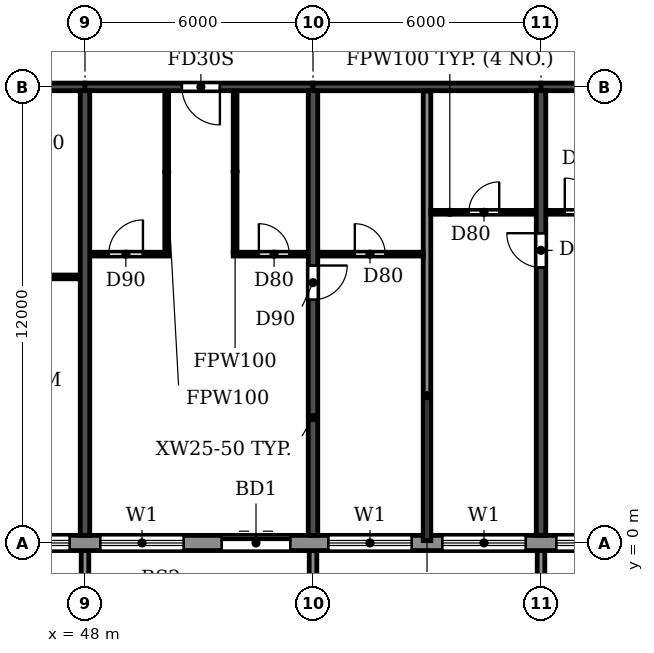
"""IFC4 building model, lengths in metres.
Left out: names, types, materials, properties, quantities, classifications, styles, units other than length and angle.
Written with IfcOpenShell. Run it as: python <this file> out.ifc"""

import sys

from ifc_helpers import new_model, si_unit, direction, frame, frame_2d, origin, place, context, subcontext, project, spatial, polyline, rectangle, outline, extrude, source, transform, mapped, element, fill, save


model = new_model("IFC4")
c1 = context("Model", 3, precision=1e-05, world=origin(), true_north=direction((0.0, 1.0)))
c2 = subcontext(c1, "Body", "Model", "MODEL_VIEW")
j1 = project(units=[si_unit("LENGTHUNIT", "METRE"), si_unit("PLANEANGLEUNIT", "RADIAN")], contexts=[c1])
p1 = place(None, origin())
s1 = spatial("IfcSite", under=j1, at=p1, CompositionType="ELEMENT")
p2 = place(p1, origin())
s2 = spatial("IfcBuilding", under=s1, at=p2, CompositionType="ELEMENT")
p3 = place(p2, frame((0.0, 0.0, 251.1)))
s3 = spatial("IfcBuildingStorey", under=s2, at=p3, CompositionType="ELEMENT", Elevation=251.1)
p4 = place(p3, frame((48.0, 0.2, 0.0), z_axis=(0.0, 0.0, 1.0), x_axis=(0.0, 1.0, 0.0)))
e1 = element("IfcWall", 1, at=p4, inside=s3, PredefinedType="SHEAR", context=c2, shape_type="SweptSolid", body=[
    extrude(rectangle(XDim=11.7, YDim=0.25, at=frame_2d((5.85, 0.0))), origin(), (0.0, 0.0, 1.0), 3.08),
])
p5 = place(p3, frame((54.0, 0.2, 0.0), z_axis=(0.0, 0.0, 1.0), x_axis=(0.0, 1.0, 0.0)))
e2 = element("IfcWall", 2, at=p5, inside=s3, PredefinedType="SHEAR", context=c2, shape_type="SweptSolid", body=[
    extrude(rectangle(XDim=11.7, YDim=0.25, at=frame_2d((5.85, 0.0))), origin(), (0.0, 0.0, 1.0), 3.08),
])
p6 = place(p5, frame((6.2, 0.0, 0.0)))
e3 = element("IfcOpeningElement", 3, at=p6, cuts=e2, PredefinedType="OPENING", context=c2, shape_type="SweptSolid", body=[
    extrude(rectangle(XDim=0.9, YDim=2.1, at=frame_2d((0.45, 1.05))), frame((0.0, 0.135, 0.0), z_axis=(0.0, -1.0, 0.0), x_axis=(1.0, 0.0, 0.0)), (0.0, 0.0, 1.0), 0.27),
])
p7 = place(p3, frame((60.0, 0.2, 0.0), z_axis=(0.0, 0.0, 1.0), x_axis=(0.0, 1.0, 0.0)))
e4 = element("IfcWall", 4, at=p7, inside=s3, PredefinedType="SHEAR", context=c2, shape_type="SweptSolid", body=[
    extrude(rectangle(XDim=11.7, YDim=0.25, at=frame_2d((5.85, 0.0))), origin(), (0.0, 0.0, 1.0), 3.08),
])
p8 = place(p7, frame((7.05, 0.0, 0.0)))
e5 = element("IfcOpeningElement", 5, at=p8, cuts=e4, PredefinedType="OPENING", context=c2, shape_type="SweptSolid", body=[
    extrude(rectangle(XDim=0.9, YDim=2.1, at=frame_2d((0.45, 1.05))), frame((0.0, 0.135, 0.0), z_axis=(0.0, -1.0, 0.0), x_axis=(1.0, 0.0, 0.0)), (0.0, 0.0, 1.0), 0.27),
])
p9 = place(p3, frame((42.0, 12.0, 0.0), z_axis=(0.0, 0.0, 1.0), x_axis=(1.0, 0.0, 0.0)))
e6 = element("IfcWall", 6, at=p9, inside=s3, PredefinedType="SHEAR", context=c2, shape_type="SweptSolid", body=[
    extrude(rectangle(XDim=6.0, YDim=0.2, at=frame_2d((3.0, 0.0))), origin(), (0.0, 0.0, 1.0), 2.48),
])
p10 = place(p9, frame((2.55, 0.0, 0.0)))
e7 = element("IfcOpeningElement", 7, at=p10, cuts=e6, PredefinedType="OPENING", context=c2, shape_type="SweptSolid", body=[
    extrude(rectangle(XDim=1.0, YDim=2.1, at=frame_2d((0.5, 1.05))), frame((0.0, 0.11, 0.0), z_axis=(0.0, -1.0, 0.0), x_axis=(1.0, 0.0, 0.0)), (0.0, 0.0, 1.0), 0.22),
])
p11 = place(p3, frame((48.0, 12.0, 0.0), z_axis=(0.0, 0.0, 1.0), x_axis=(1.0, 0.0, 0.0)))
e8 = element("IfcWall", 8, at=p11, inside=s3, PredefinedType="SHEAR", context=c2, shape_type="SweptSolid", body=[
    extrude(rectangle(XDim=6.0, YDim=0.2, at=frame_2d((3.0, 0.0))), origin(), (0.0, 0.0, 1.0), 2.48),
])
p12 = place(p11, frame((2.55, 0.0, 0.0)))
e9 = element("IfcOpeningElement", 9, at=p12, cuts=e8, PredefinedType="OPENING", context=c2, shape_type="SweptSolid", body=[
    extrude(rectangle(XDim=1.0, YDim=2.1, at=frame_2d((0.5, 1.05))), frame((0.0, 0.11, 0.0), z_axis=(0.0, -1.0, 0.0), x_axis=(1.0, 0.0, 0.0)), (0.0, 0.0, 1.0), 0.22),
])
p13 = place(p3, frame((54.0, 12.0, 0.0), z_axis=(0.0, 0.0, 1.0), x_axis=(1.0, 0.0, 0.0)))
e10 = element("IfcWall", 10, at=p13, inside=s3, PredefinedType="SHEAR", context=c2, shape_type="SweptSolid", body=[
    extrude(rectangle(XDim=6.0, YDim=0.2, at=frame_2d((3.0, 0.0))), origin(), (0.0, 0.0, 1.0), 2.48),
])
p14 = place(p3, frame((60.0, 12.0, 0.0), z_axis=(0.0, 0.0, 1.0), x_axis=(1.0, 0.0, 0.0)))
e11 = element("IfcWall", 11, at=p14, inside=s3, PredefinedType="SHEAR", context=c2, shape_type="SweptSolid", body=[
    extrude(rectangle(XDim=6.0, YDim=0.2, at=frame_2d((3.0, 0.0))), origin(), (0.0, 0.0, 1.0), 2.48),
])
p15 = place(p14, frame((2.55, 0.0, 0.0)))
e12 = element("IfcOpeningElement", 12, at=p15, cuts=e11, PredefinedType="OPENING", context=c2, shape_type="SweptSolid", body=[
    extrude(rectangle(XDim=1.0, YDim=2.1, at=frame_2d((0.5, 1.05))), frame((0.0, 0.11, 0.0), z_axis=(0.0, -1.0, 0.0), x_axis=(1.0, 0.0, 0.0)), (0.0, 0.0, 1.0), 0.22),
])
p16 = place(p3, frame((22.683, 0.0, 0.0), z_axis=(0.0, 0.0, 1.0), x_axis=(1.0, 0.0, 0.0)))
e13 = element("IfcWall", 13, at=p16, inside=s3, PredefinedType="STANDARD", context=c2, shape_type="SweptSolid", body=[
    extrude(rectangle(XDim=56.634, YDim=0.4, at=frame_2d((28.317, 0.0))), origin(), (0.0, 0.0, 1.0), 3.08),
])
p17 = place(p16, frame((1.717, 0.0, 0.9)))
e14 = element("IfcOpeningElement", 14, at=p17, cuts=e13, PredefinedType="OPENING", context=c2, shape_type="SweptSolid", body=[
    extrude(rectangle(XDim=2.2, YDim=1.5, at=frame_2d((1.1, 0.75))), frame((0.0, 0.21, 0.0), z_axis=(0.0, -1.0, 0.0), x_axis=(1.0, 0.0, 0.0)), (0.0, 0.0, 1.0), 0.42),
])
p18 = place(p16, frame((4.917, 0.0, 0.0)))
e15 = element("IfcOpeningElement", 15, at=p18, cuts=e13, PredefinedType="OPENING", context=c2, shape_type="SweptSolid", body=[
    extrude(rectangle(XDim=1.8, YDim=2.4, at=frame_2d((0.9, 1.2))), frame((0.0, 0.21, 0.0), z_axis=(0.0, -1.0, 0.0), x_axis=(1.0, 0.0, 0.0)), (0.0, 0.0, 1.0), 0.42),
])
p19 = place(p16, frame((7.717, 0.0, 0.9)))
e16 = element("IfcOpeningElement", 16, at=p19, cuts=e13, PredefinedType="OPENING", context=c2, shape_type="SweptSolid", body=[
    extrude(rectangle(XDim=2.2, YDim=1.5, at=frame_2d((1.1, 0.75))), frame((0.0, 0.21, 0.0), z_axis=(0.0, -1.0, 0.0), x_axis=(1.0, 0.0, 0.0)), (0.0, 0.0, 1.0), 0.42),
])
p20 = place(p16, frame((10.717, 0.0, 0.9)))
e17 = element("IfcOpeningElement", 17, at=p20, cuts=e13, PredefinedType="OPENING", context=c2, shape_type="SweptSolid", body=[
    extrude(rectangle(XDim=2.2, YDim=1.5, at=frame_2d((1.1, 0.75))), frame((0.0, 0.21, 0.0), z_axis=(0.0, -1.0, 0.0), x_axis=(1.0, 0.0, 0.0)), (0.0, 0.0, 1.0), 0.42),
])
p21 = place(p16, frame((13.717, 0.0, 0.9)))
e18 = element("IfcOpeningElement", 18, at=p21, cuts=e13, PredefinedType="OPENING", context=c2, shape_type="SweptSolid", body=[
    extrude(rectangle(XDim=2.2, YDim=1.5, at=frame_2d((1.1, 0.75))), frame((0.0, 0.21, 0.0), z_axis=(0.0, -1.0, 0.0), x_axis=(1.0, 0.0, 0.0)), (0.0, 0.0, 1.0), 0.42),
])
p22 = place(p16, frame((16.917, 0.0, 0.0)))
e19 = element("IfcOpeningElement", 19, at=p22, cuts=e13, PredefinedType="OPENING", context=c2, shape_type="SweptSolid", body=[
    extrude(rectangle(XDim=1.8, YDim=2.4, at=frame_2d((0.9, 1.2))), frame((0.0, 0.21, 0.0), z_axis=(0.0, -1.0, 0.0), x_axis=(1.0, 0.0, 0.0)), (0.0, 0.0, 1.0), 0.42),
])
p23 = place(p16, frame((19.717, 0.0, 0.9)))
e20 = element("IfcOpeningElement", 20, at=p23, cuts=e13, PredefinedType="OPENING", context=c2, shape_type="SweptSolid", body=[
    extrude(rectangle(XDim=2.2, YDim=1.5, at=frame_2d((1.1, 0.75))), frame((0.0, 0.21, 0.0), z_axis=(0.0, -1.0, 0.0), x_axis=(1.0, 0.0, 0.0)), (0.0, 0.0, 1.0), 0.42),
])
p24 = place(p16, frame((22.717, 0.0, 0.9)))
e21 = element("IfcOpeningElement", 21, at=p24, cuts=e13, PredefinedType="OPENING", context=c2, shape_type="SweptSolid", body=[
    extrude(rectangle(XDim=2.2, YDim=1.5, at=frame_2d((1.1, 0.75))), frame((0.0, 0.21, 0.0), z_axis=(0.0, -1.0, 0.0), x_axis=(1.0, 0.0, 0.0)), (0.0, 0.0, 1.0), 0.42),
])
p25 = place(p16, frame((25.717, 0.0, 0.9)))
e22 = element("IfcOpeningElement", 22, at=p25, cuts=e13, PredefinedType="OPENING", context=c2, shape_type="SweptSolid", body=[
    extrude(rectangle(XDim=2.2, YDim=1.5, at=frame_2d((1.1, 0.75))), frame((0.0, 0.21, 0.0), z_axis=(0.0, -1.0, 0.0), x_axis=(1.0, 0.0, 0.0)), (0.0, 0.0, 1.0), 0.42),
])
p26 = place(p16, frame((28.917, 0.0, 0.0)))
e23 = element("IfcOpeningElement", 23, at=p26, cuts=e13, PredefinedType="OPENING", context=c2, shape_type="SweptSolid", body=[
    extrude(rectangle(XDim=1.8, YDim=2.4, at=frame_2d((0.9, 1.2))), frame((0.0, 0.21, 0.0), z_axis=(0.0, -1.0, 0.0), x_axis=(1.0, 0.0, 0.0)), (0.0, 0.0, 1.0), 0.42),
])
p27 = place(p16, frame((31.717, 0.0, 0.9)))
e24 = element("IfcOpeningElement", 24, at=p27, cuts=e13, PredefinedType="OPENING", context=c2, shape_type="SweptSolid", body=[
    extrude(rectangle(XDim=2.2, YDim=1.5, at=frame_2d((1.1, 0.75))), frame((0.0, 0.21, 0.0), z_axis=(0.0, -1.0, 0.0), x_axis=(1.0, 0.0, 0.0)), (0.0, 0.0, 1.0), 0.42),
])
p28 = place(p16, frame((34.717, 0.0, 0.9)))
e25 = element("IfcOpeningElement", 25, at=p28, cuts=e13, PredefinedType="OPENING", context=c2, shape_type="SweptSolid", body=[
    extrude(rectangle(XDim=2.2, YDim=1.5, at=frame_2d((1.1, 0.75))), frame((0.0, 0.21, 0.0), z_axis=(0.0, -1.0, 0.0), x_axis=(1.0, 0.0, 0.0)), (0.0, 0.0, 1.0), 0.42),
])
p29 = place(p16, frame((37.717, 0.0, 0.9)))
e26 = element("IfcOpeningElement", 26, at=p29, cuts=e13, PredefinedType="OPENING", context=c2, shape_type="SweptSolid", body=[
    extrude(rectangle(XDim=2.2, YDim=1.5, at=frame_2d((1.1, 0.75))), frame((0.0, 0.21, 0.0), z_axis=(0.0, -1.0, 0.0), x_axis=(1.0, 0.0, 0.0)), (0.0, 0.0, 1.0), 0.42),
])
p30 = place(p16, frame((40.917, 0.0, 0.0)))
e27 = element("IfcOpeningElement", 27, at=p30, cuts=e13, PredefinedType="OPENING", context=c2, shape_type="SweptSolid", body=[
    extrude(rectangle(XDim=1.8, YDim=2.4, at=frame_2d((0.9, 1.2))), frame((0.0, 0.21, 0.0), z_axis=(0.0, -1.0, 0.0), x_axis=(1.0, 0.0, 0.0)), (0.0, 0.0, 1.0), 0.42),
])
p31 = place(p16, frame((43.717, 0.0, 0.9)))
e28 = element("IfcOpeningElement", 28, at=p31, cuts=e13, PredefinedType="OPENING", context=c2, shape_type="SweptSolid", body=[
    extrude(rectangle(XDim=2.2, YDim=1.5, at=frame_2d((1.1, 0.75))), frame((0.0, 0.21, 0.0), z_axis=(0.0, -1.0, 0.0), x_axis=(1.0, 0.0, 0.0)), (0.0, 0.0, 1.0), 0.42),
])
p32 = place(p16, frame((46.717, 0.0, 0.9)))
e29 = element("IfcOpeningElement", 29, at=p32, cuts=e13, PredefinedType="OPENING", context=c2, shape_type="SweptSolid", body=[
    extrude(rectangle(XDim=2.2, YDim=1.5, at=frame_2d((1.1, 0.75))), frame((0.0, 0.21, 0.0), z_axis=(0.0, -1.0, 0.0), x_axis=(1.0, 0.0, 0.0)), (0.0, 0.0, 1.0), 0.42),
])
p33 = place(p16, frame((49.717, 0.0, 0.9)))
e30 = element("IfcOpeningElement", 30, at=p33, cuts=e13, PredefinedType="OPENING", context=c2, shape_type="SweptSolid", body=[
    extrude(rectangle(XDim=2.2, YDim=1.5, at=frame_2d((1.1, 0.75))), frame((0.0, 0.21, 0.0), z_axis=(0.0, -1.0, 0.0), x_axis=(1.0, 0.0, 0.0)), (0.0, 0.0, 1.0), 0.42),
])
p34 = place(p16, frame((52.917, 0.0, 0.0)))
e31 = element("IfcOpeningElement", 31, at=p34, cuts=e13, PredefinedType="OPENING", context=c2, shape_type="SweptSolid", body=[
    extrude(rectangle(XDim=1.8, YDim=2.4, at=frame_2d((0.9, 1.2))), frame((0.0, 0.21, 0.0), z_axis=(0.0, -1.0, 0.0), x_axis=(1.0, 0.0, 0.0)), (0.0, 0.0, 1.0), 0.42),
])
m1 = source(origin(), c2, "Body", "SweptSolid", [
    extrude(outline(polyline([(0.0, 0.0), (0.2, 0.0), (0.2, 1.65), (0.0, 1.65), (0.0, 0.0)])), origin(), (0.0, 0.0, 1.0), 3.1),
])
for number, where in (
    (32, (47.9, -1.85, 0.0)),
    (33, (53.9, -1.85, 0.0)),
    (34, (59.9, -1.85, 0.0)),
):
    element("IfcWall", number, at=place(p3, frame(where)), inside=s3, PredefinedType="STANDARD", context=c2, shape_type="MappedRepresentation", body=[
        mapped(m1, transform((0.0, 0.0, 0.0))),
    ])
p35 = place(p3, frame((57.0, 0.06, 0.0), z_axis=(0.0, 0.0, 1.0), x_axis=(0.0, 1.0, 0.0)))
e35 = element("IfcWall", 35, at=p35, inside=s3, PredefinedType="PARTITIONING", context=c2, shape_type="SweptSolid", body=[
    extrude(rectangle(XDim=11.83, YDim=0.2, at=frame_2d((5.915, 0.0))), origin(), (0.0, 0.0, 1.0), 3.08),
])
p36 = place(p3, frame((45.9, 7.0, 0.0), z_axis=(0.0, 0.0, 1.0), x_axis=(1.0, 0.0, 0.0)))
e36 = element("IfcWall", 36, at=p36, inside=s3, PredefinedType="PARTITIONING", context=c2, shape_type="SweptSolid", body=[
    extrude(rectangle(XDim=1.965, YDim=0.1, at=frame_2d((0.982, 0.0))), origin(), (0.0, 0.0, 1.0), 3.08),
])
p37 = place(p3, frame((48.135, 7.6, 0.0), z_axis=(0.0, 0.0, 1.0), x_axis=(1.0, 0.0, 0.0)))
e37 = element("IfcWall", 37, at=p37, inside=s3, PredefinedType="PARTITIONING", context=c2, shape_type="SweptSolid", body=[
    extrude(rectangle(XDim=2.065, YDim=0.1, at=frame_2d((1.032, 0.0))), origin(), (0.0, 0.0, 1.0), 3.08),
])
p38 = place(p37, frame((0.49, 0.0, 0.0)))
e38 = element("IfcOpeningElement", 38, at=p38, cuts=e37, PredefinedType="OPENING", context=c2, shape_type="SweptSolid", body=[
    extrude(rectangle(XDim=0.9, YDim=2.1, at=frame_2d((0.45, 1.05))), frame((0.0, 0.06, 0.0), z_axis=(0.0, -1.0, 0.0), x_axis=(1.0, 0.0, 0.0)), (0.0, 0.0, 1.0), 0.12),
])
p39 = place(p3, frame((51.9, 7.6, 0.0), z_axis=(0.0, 0.0, 1.0), x_axis=(1.0, 0.0, 0.0)))
e39 = element("IfcWall", 39, at=p39, inside=s3, PredefinedType="PARTITIONING", context=c2, shape_type="SweptSolid", body=[
    extrude(rectangle(XDim=1.965, YDim=0.1, at=frame_2d((0.982, 0.0))), origin(), (0.0, 0.0, 1.0), 3.08),
])
p40 = place(p39, frame((0.675, 0.0, 0.0)))
e40 = element("IfcOpeningElement", 40, at=p40, cuts=e39, PredefinedType="OPENING", context=c2, shape_type="SweptSolid", body=[
    extrude(rectangle(XDim=0.8, YDim=2.1, at=frame_2d((0.4, 1.05))), frame((0.0, 0.06, 0.0), z_axis=(0.0, -1.0, 0.0), x_axis=(1.0, 0.0, 0.0)), (0.0, 0.0, 1.0), 0.12),
])
p41 = place(p3, frame((54.135, 7.6, 0.0), z_axis=(0.0, 0.0, 1.0), x_axis=(1.0, 0.0, 0.0)))
e41 = element("IfcWall", 41, at=p41, inside=s3, PredefinedType="PARTITIONING", context=c2, shape_type="SweptSolid", body=[
    extrude(rectangle(XDim=2.765, YDim=0.1, at=frame_2d((1.382, 0.0))), origin(), (0.0, 0.0, 1.0), 3.08),
])
p42 = place(p41, frame((0.965, 0.0, 0.0)))
e42 = element("IfcOpeningElement", 42, at=p42, cuts=e41, PredefinedType="OPENING", context=c2, shape_type="SweptSolid", body=[
    extrude(rectangle(XDim=0.8, YDim=2.1, at=frame_2d((0.4, 1.05))), frame((0.0, 0.06, 0.0), z_axis=(0.0, -1.0, 0.0), x_axis=(1.0, 0.0, 0.0)), (0.0, 0.0, 1.0), 0.12),
])
p43 = place(p3, frame((57.1, 8.7, 0.0), z_axis=(0.0, 0.0, 1.0), x_axis=(1.0, 0.0, 0.0)))
e43 = element("IfcWall", 43, at=p43, inside=s3, PredefinedType="PARTITIONING", context=c2, shape_type="SweptSolid", body=[
    extrude(rectangle(XDim=2.765, YDim=0.1, at=frame_2d((1.382, 0.0))), origin(), (0.0, 0.0, 1.0), 3.08),
])
p44 = place(p43, frame((1.0, 0.0, 0.0)))
e44 = element("IfcOpeningElement", 44, at=p44, cuts=e43, PredefinedType="OPENING", context=c2, shape_type="SweptSolid", body=[
    extrude(rectangle(XDim=0.8, YDim=2.1, at=frame_2d((0.4, 1.05))), frame((0.0, 0.06, 0.0), z_axis=(0.0, -1.0, 0.0), x_axis=(1.0, 0.0, 0.0)), (0.0, 0.0, 1.0), 0.12),
])
p45 = place(p3, frame((60.135, 8.7, 0.0), z_axis=(0.0, 0.0, 1.0), x_axis=(1.0, 0.0, 0.0)))
e45 = element("IfcWall", 45, at=p45, inside=s3, PredefinedType="PARTITIONING", context=c2, shape_type="SweptSolid", body=[
    extrude(rectangle(XDim=2.065, YDim=0.1, at=frame_2d((1.032, 0.0))), origin(), (0.0, 0.0, 1.0), 3.08),
])
p46 = place(p45, frame((0.49, 0.0, 0.0)))
e46 = element("IfcOpeningElement", 46, at=p46, cuts=e45, PredefinedType="OPENING", context=c2, shape_type="SweptSolid", body=[
    extrude(rectangle(XDim=0.9, YDim=2.1, at=frame_2d((0.45, 1.05))), frame((0.0, 0.06, 0.0), z_axis=(0.0, -1.0, 0.0), x_axis=(1.0, 0.0, 0.0)), (0.0, 0.0, 1.0), 0.12),
])
for number, where, z_axis, x_axis in (
    (47, (50.15, 7.65, 0.0), (0.0, 0.0, 1.0), (0.0, 1.0, 0.0)),
    (48, (51.95, 7.65, 0.0), (0.0, 0.0, 1.0), (0.0, 1.0, 0.0)),
):
    element("IfcWall", number, at=place(p3, frame(where, z_axis=z_axis, x_axis=x_axis)), inside=s3, PredefinedType="PARTITIONING", context=c2, shape_type="SweptSolid", body=[
        extrude(rectangle(XDim=4.24, YDim=0.1, at=frame_2d((2.12, 0.0))), origin(), (0.0, 0.0, 1.0), 3.08),
    ])
p47 = place(p24, origin())
e49 = element("IfcWindow", 49, at=p47, inside=s3, PartitioningType="DOUBLE_PANEL_HORIZONTAL", PredefinedType="WINDOW", context=c2, shape_type="SweptSolid", body=[
    extrude(rectangle(XDim=2.2, YDim=1.5, at=frame_2d((1.1, 0.75))), frame((0.0, 0.03, 0.0), z_axis=(0.0, -1.0, 0.0), x_axis=(1.0, 0.0, 0.0)), (0.0, 0.0, 1.0), 0.06),
])
fill(e21, e49)
p48 = place(p25, origin())
e50 = element("IfcWindow", 50, at=p48, inside=s3, PartitioningType="DOUBLE_PANEL_HORIZONTAL", PredefinedType="WINDOW", context=c2, shape_type="SweptSolid", body=[
    extrude(rectangle(XDim=2.2, YDim=1.5, at=frame_2d((1.1, 0.75))), frame((0.0, 0.03, 0.0), z_axis=(0.0, -1.0, 0.0), x_axis=(1.0, 0.0, 0.0)), (0.0, 0.0, 1.0), 0.06),
])
fill(e22, e50)
p49 = place(p26, origin())
e51 = element("IfcDoor", 51, at=p49, inside=s3, OperationType="DOUBLE_DOOR_SLIDING", PredefinedType="DOOR", context=c2, shape_type="SweptSolid", body=[
    extrude(rectangle(XDim=1.8, YDim=2.4, at=frame_2d((0.9, 1.2))), frame((0.0, 0.025, 0.0), z_axis=(0.0, -1.0, 0.0), x_axis=(1.0, 0.0, 0.0)), (0.0, 0.0, 1.0), 0.05),
])
fill(e23, e51)
p50 = place(p27, origin())
e52 = element("IfcWindow", 52, at=p50, inside=s3, PartitioningType="DOUBLE_PANEL_HORIZONTAL", PredefinedType="WINDOW", context=c2, shape_type="SweptSolid", body=[
    extrude(rectangle(XDim=2.2, YDim=1.5, at=frame_2d((1.1, 0.75))), frame((0.0, 0.03, 0.0), z_axis=(0.0, -1.0, 0.0), x_axis=(1.0, 0.0, 0.0)), (0.0, 0.0, 1.0), 0.06),
])
fill(e24, e52)
p51 = place(p28, origin())
e53 = element("IfcWindow", 53, at=p51, inside=s3, PartitioningType="DOUBLE_PANEL_HORIZONTAL", PredefinedType="WINDOW", context=c2, shape_type="SweptSolid", body=[
    extrude(rectangle(XDim=2.2, YDim=1.5, at=frame_2d((1.1, 0.75))), frame((0.0, 0.03, 0.0), z_axis=(0.0, -1.0, 0.0), x_axis=(1.0, 0.0, 0.0)), (0.0, 0.0, 1.0), 0.06),
])
fill(e25, e53)
p52 = place(p29, origin())
e54 = element("IfcWindow", 54, at=p52, inside=s3, PartitioningType="DOUBLE_PANEL_HORIZONTAL", PredefinedType="WINDOW", context=c2, shape_type="SweptSolid", body=[
    extrude(rectangle(XDim=2.2, YDim=1.5, at=frame_2d((1.1, 0.75))), frame((0.0, 0.03, 0.0), z_axis=(0.0, -1.0, 0.0), x_axis=(1.0, 0.0, 0.0)), (0.0, 0.0, 1.0), 0.06),
])
fill(e26, e54)
p53 = place(p42, origin())
e55 = element("IfcDoor", 55, at=p53, inside=s3, OperationType="SINGLE_SWING_LEFT", PredefinedType="DOOR", context=c2, shape_type="SweptSolid", body=[
    extrude(rectangle(XDim=0.8, YDim=2.1, at=frame_2d((0.4, 1.05))), frame((0.0, 0.025, 0.0), z_axis=(0.0, -1.0, 0.0), x_axis=(1.0, 0.0, 0.0)), (0.0, 0.0, 1.0), 0.05),
])
fill(e42, e55)
p54 = place(p38, origin())
e56 = element("IfcDoor", 56, at=p54, inside=s3, OperationType="SINGLE_SWING_RIGHT", PredefinedType="DOOR", context=c2, shape_type="SweptSolid", body=[
    extrude(rectangle(XDim=0.9, YDim=2.1, at=frame_2d((0.45, 1.05))), frame((0.0, 0.025, 0.0), z_axis=(0.0, -1.0, 0.0), x_axis=(1.0, 0.0, 0.0)), (0.0, 0.0, 1.0), 0.05),
])
fill(e38, e56)
p55 = place(p12, frame((1.0, 0.0, 0.0), z_axis=(0.0, 0.0, 1.0), x_axis=(-1.0, 0.0, 0.0)))
e57 = element("IfcDoor", 57, at=p55, inside=s3, OperationType="SINGLE_SWING_LEFT", PredefinedType="DOOR", context=c2, shape_type="SweptSolid", body=[
    extrude(rectangle(XDim=1.0, YDim=2.1, at=frame_2d((0.5, 1.05))), frame((0.0, 0.025, 0.0), z_axis=(0.0, -1.0, 0.0), x_axis=(1.0, 0.0, 0.0)), (0.0, 0.0, 1.0), 0.05),
])
fill(e9, e57)
p56 = place(p40, origin())
e58 = element("IfcDoor", 58, at=p56, inside=s3, OperationType="SINGLE_SWING_LEFT", PredefinedType="DOOR", context=c2, shape_type="SweptSolid", body=[
    extrude(rectangle(XDim=0.8, YDim=2.1, at=frame_2d((0.4, 1.05))), frame((0.0, 0.025, 0.0), z_axis=(0.0, -1.0, 0.0), x_axis=(1.0, 0.0, 0.0)), (0.0, 0.0, 1.0), 0.05),
])
fill(e40, e58)
p57 = place(p6, frame((0.9, 0.0, 0.0), z_axis=(0.0, 0.0, 1.0), x_axis=(-1.0, 0.0, 0.0)))
e59 = element("IfcDoor", 59, at=p57, inside=s3, OperationType="SINGLE_SWING_LEFT", PredefinedType="DOOR", context=c2, shape_type="SweptSolid", body=[
    extrude(rectangle(XDim=0.9, YDim=2.1, at=frame_2d((0.45, 1.05))), frame((0.0, 0.025, 0.0), z_axis=(0.0, -1.0, 0.0), x_axis=(1.0, 0.0, 0.0)), (0.0, 0.0, 1.0), 0.05),
])
fill(e3, e59)
p58 = place(p44, origin())
e60 = element("IfcDoor", 60, at=p58, inside=s3, OperationType="SINGLE_SWING_RIGHT", PredefinedType="DOOR", context=c2, shape_type="SweptSolid", body=[
    extrude(rectangle(XDim=0.8, YDim=2.1, at=frame_2d((0.4, 1.05))), frame((0.0, 0.025, 0.0), z_axis=(0.0, -1.0, 0.0), x_axis=(1.0, 0.0, 0.0)), (0.0, 0.0, 1.0), 0.05),
])
fill(e44, e60)
p59 = place(p8, origin())
e61 = element("IfcDoor", 61, at=p59, inside=s3, OperationType="SINGLE_SWING_RIGHT", PredefinedType="DOOR", context=c2, shape_type="SweptSolid", body=[
    extrude(rectangle(XDim=0.9, YDim=2.1, at=frame_2d((0.45, 1.05))), frame((0.0, 0.025, 0.0), z_axis=(0.0, -1.0, 0.0), x_axis=(1.0, 0.0, 0.0)), (0.0, 0.0, 1.0), 0.05),
])
fill(e5, e61)
p60 = place(p46, origin())
e62 = element("IfcDoor", 62, at=p60, inside=s3, OperationType="SINGLE_SWING_LEFT", PredefinedType="DOOR", context=c2, shape_type="SweptSolid", body=[
    extrude(rectangle(XDim=0.9, YDim=2.1, at=frame_2d((0.45, 1.05))), frame((0.0, 0.025, 0.0), z_axis=(0.0, -1.0, 0.0), x_axis=(1.0, 0.0, 0.0)), (0.0, 0.0, 1.0), 0.05),
])
fill(e46, e62)
save(model, sys.argv[1])
